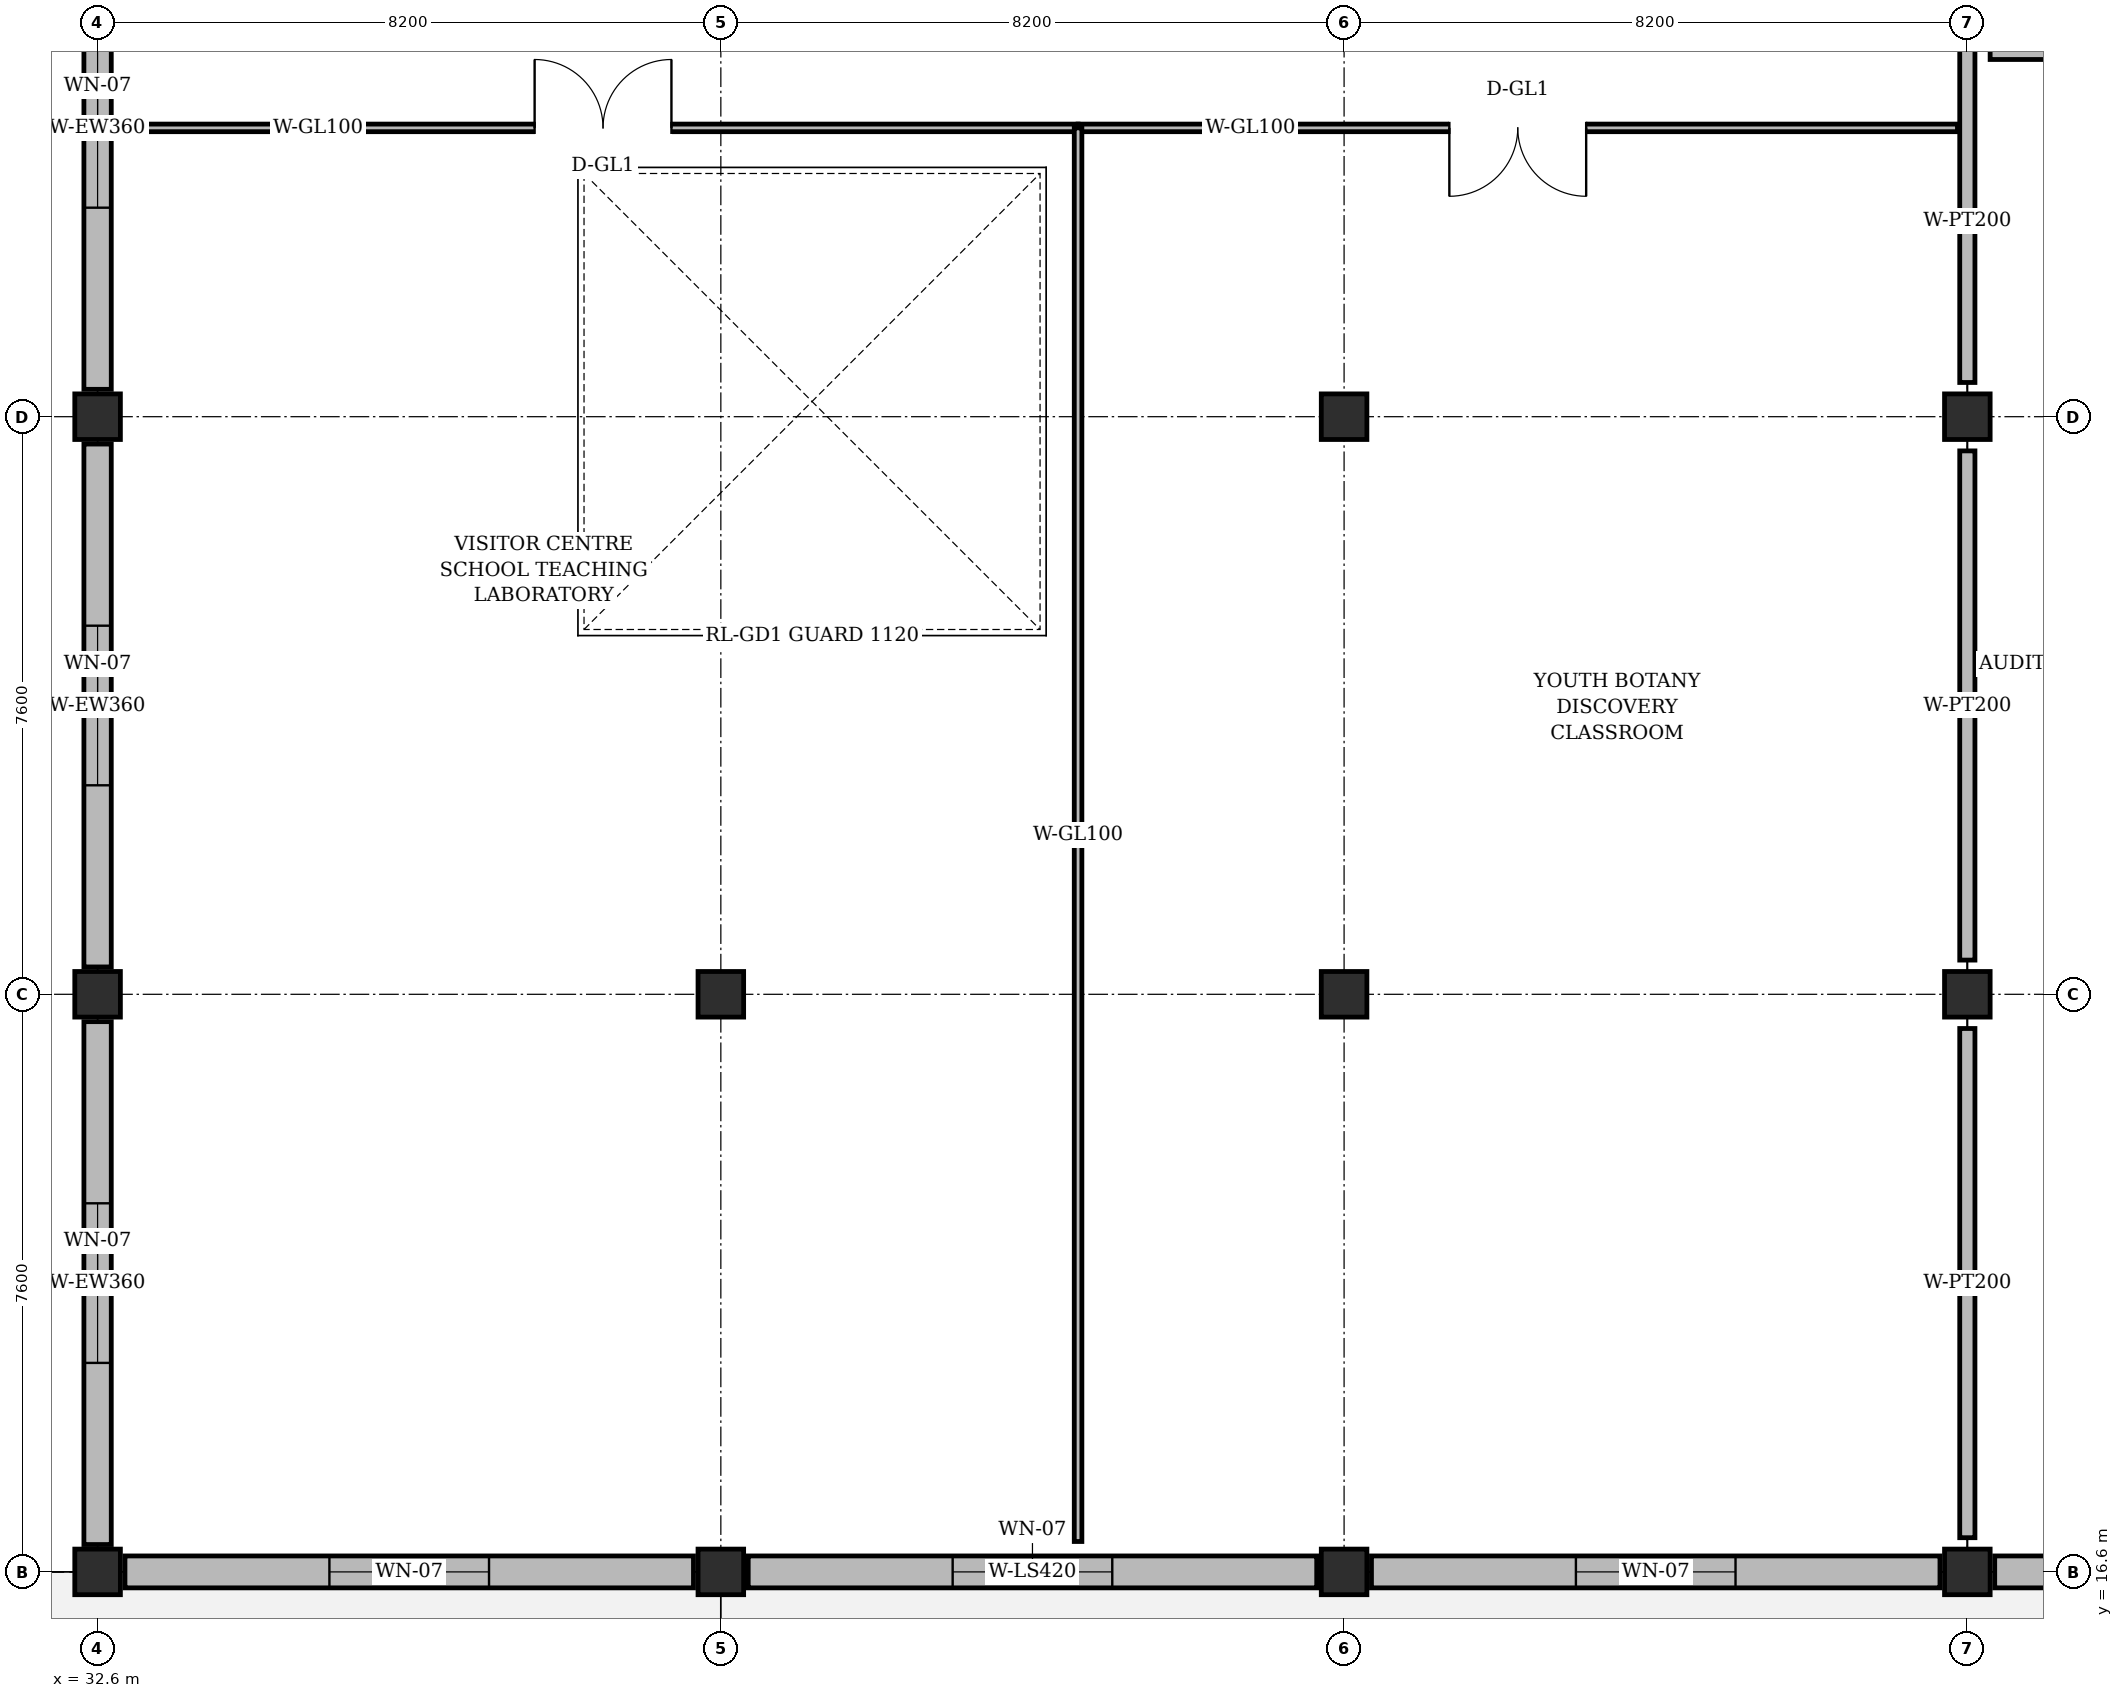
"""IFC4 building model, lengths in metres.
Left out: names, types, materials, properties, quantities, classifications, styles, units other than length and angle.
Written with IfcOpenShell. Run it as: python <this file> out.ifc"""

import sys

from ifc_helpers import new_model, si_unit, direction, frame, frame_2d, origin, origin_2d, place, context, subcontext, project, spatial, rectangle, extrude, element, fill, save


model = new_model("IFC4")
c1 = context("Model", 3, precision=1e-05, world=origin(), true_north=direction((0.0, 1.0)))
c2 = subcontext(c1, "Body", "Model", "MODEL_VIEW")
j1 = project(units=[si_unit("LENGTHUNIT", "METRE"), si_unit("PLANEANGLEUNIT", "RADIAN")], contexts=[c1])
p1 = place(None, origin())
s1 = spatial("IfcSite", under=j1, at=p1, CompositionType="ELEMENT")
p2 = place(p1, origin())
s2 = spatial("IfcBuilding", under=s1, at=p2, CompositionType="ELEMENT")
p3 = place(p2, frame((0.0, 0.0, 5.4)))
s3 = spatial("IfcBuildingStorey", under=s2, at=p3, CompositionType="ELEMENT", Elevation=5.4)
for number, where, z_axis, x_axis in (
    (1, (32.6, 16.6, 0.0), (0.0, 0.0, 1.0), (1.0, 0.0, 0.0)),
    (2, (32.6, 24.2, 0.0), (0.0, 0.0, 1.0), (1.0, 0.0, 0.0)),
    (3, (32.6, 31.8, 0.0), (0.0, 0.0, 1.0), (1.0, 0.0, 0.0)),
    (4, (40.8, 16.6, 0.0), (0.0, 0.0, 1.0), (1.0, 0.0, 0.0)),
    (5, (40.8, 24.2, 0.0), (0.0, 0.0, 1.0), (1.0, 0.0, 0.0)),
    (6, (49.0, 16.6, 0.0), (0.0, 0.0, 1.0), (1.0, 0.0, 0.0)),
    (7, (49.0, 24.2, 0.0), (0.0, 0.0, 1.0), (1.0, 0.0, 0.0)),
    (8, (49.0, 31.8, 0.0), (0.0, 0.0, 1.0), (1.0, 0.0, 0.0)),
    (9, (57.2, 16.6, 0.0), (0.0, 0.0, 1.0), (1.0, 0.0, 0.0)),
    (10, (57.2, 24.2, 0.0), (0.0, 0.0, 1.0), (1.0, 0.0, 0.0)),
    (11, (57.2, 31.8, 0.0), (0.0, 0.0, 1.0), (1.0, 0.0, 0.0)),
):
    element("IfcColumn", number, at=place(p3, frame(where, z_axis=z_axis, x_axis=x_axis)), inside=s3, PredefinedType="COLUMN", context=c2, shape_type="SweptSolid", body=[
        extrude(rectangle(XDim=0.6, YDim=0.6, at=origin_2d()), origin(), (0.0, 0.0, 1.0), 4.545),
    ])
p4 = place(p3, frame((57.56, 16.6, 0.0), z_axis=(0.0, 0.0, 1.0), x_axis=(1.0, 0.0, 0.0)))
e12 = element("IfcWall", 12, at=p4, inside=s3, PredefinedType="SOLIDWALL", context=c2, shape_type="SweptSolid", body=[
    extrude(rectangle(XDim=7.48, YDim=0.42, at=frame_2d((3.74, 0.0))), origin(), (0.0, 0.0, 1.0), 3.885),
])
p5 = place(p4, frame((3.14, 0.0, 0.95)))
e13 = element("IfcOpeningElement", 13, at=p5, cuts=e12, PredefinedType="OPENING", context=c2, shape_type="SweptSolid", body=[
    extrude(rectangle(XDim=1.2, YDim=2.6, at=frame_2d((0.6, 1.3))), frame((0.0, 0.222, 0.0), z_axis=(0.0, -1.0, 0.0), x_axis=(1.0, 0.0, 0.0)), (0.0, 0.0, 1.0), 0.444),
])
p6 = place(p3, frame((32.96, 16.6, 0.0), z_axis=(0.0, 0.0, 1.0), x_axis=(1.0, 0.0, 0.0)))
e14 = element("IfcWall", 14, at=p6, inside=s3, PredefinedType="SOLIDWALL", context=c2, shape_type="SweptSolid", body=[
    extrude(rectangle(XDim=7.48, YDim=0.42, at=frame_2d((3.74, 0.0))), origin(), (0.0, 0.0, 1.0), 3.885),
])
p7 = place(p6, frame((2.69, 0.0, 0.95)))
e15 = element("IfcOpeningElement", 15, at=p7, cuts=e14, PredefinedType="OPENING", context=c2, shape_type="SweptSolid", body=[
    extrude(rectangle(XDim=2.1, YDim=1.95, at=frame_2d((1.05, 0.975))), frame((0.0, 0.222, 0.0), z_axis=(0.0, -1.0, 0.0), x_axis=(1.0, 0.0, 0.0)), (0.0, 0.0, 1.0), 0.444),
])
p8 = place(p3, frame((41.16, 16.6, 0.0), z_axis=(0.0, 0.0, 1.0), x_axis=(1.0, 0.0, 0.0)))
e16 = element("IfcWall", 16, at=p8, inside=s3, PredefinedType="SOLIDWALL", context=c2, shape_type="SweptSolid", body=[
    extrude(rectangle(XDim=7.48, YDim=0.42, at=frame_2d((3.74, 0.0))), origin(), (0.0, 0.0, 1.0), 3.885),
])
p9 = place(p8, frame((2.69, 0.0, 0.95)))
e17 = element("IfcOpeningElement", 17, at=p9, cuts=e16, PredefinedType="OPENING", context=c2, shape_type="SweptSolid", body=[
    extrude(rectangle(XDim=2.1, YDim=1.95, at=frame_2d((1.05, 0.975))), frame((0.0, 0.222, 0.0), z_axis=(0.0, -1.0, 0.0), x_axis=(1.0, 0.0, 0.0)), (0.0, 0.0, 1.0), 0.444),
])
p10 = place(p3, frame((49.36, 16.6, 0.0), z_axis=(0.0, 0.0, 1.0), x_axis=(1.0, 0.0, 0.0)))
e18 = element("IfcWall", 18, at=p10, inside=s3, PredefinedType="SOLIDWALL", context=c2, shape_type="SweptSolid", body=[
    extrude(rectangle(XDim=7.48, YDim=0.42, at=frame_2d((3.74, 0.0))), origin(), (0.0, 0.0, 1.0), 3.885),
])
p11 = place(p10, frame((2.69, 0.0, 0.95)))
e19 = element("IfcOpeningElement", 19, at=p11, cuts=e18, PredefinedType="OPENING", context=c2, shape_type="SweptSolid", body=[
    extrude(rectangle(XDim=2.1, YDim=1.95, at=frame_2d((1.05, 0.975))), frame((0.0, 0.222, 0.0), z_axis=(0.0, -1.0, 0.0), x_axis=(1.0, 0.0, 0.0)), (0.0, 0.0, 1.0), 0.444),
])
p12 = place(p3, frame((32.6, 39.04, 0.0), z_axis=(0.0, 0.0, 1.0), x_axis=(0.0, -1.0, 0.0)))
e20 = element("IfcWall", 20, at=p12, inside=s3, PredefinedType="SOLIDWALL", context=c2, shape_type="SweptSolid", body=[
    extrude(rectangle(XDim=6.88, YDim=0.36, at=frame_2d((3.44, 0.0))), origin(), (0.0, 0.0, 1.0), 3.885),
])
p13 = place(p12, frame((2.39, 0.0, 0.95)))
e21 = element("IfcOpeningElement", 21, at=p13, cuts=e20, PredefinedType="OPENING", context=c2, shape_type="SweptSolid", body=[
    extrude(rectangle(XDim=2.1, YDim=1.95, at=frame_2d((1.05, 0.975))), frame((0.0, 0.192, 0.0), z_axis=(0.0, -1.0, 0.0), x_axis=(1.0, 0.0, 0.0)), (0.0, 0.0, 1.0), 0.384),
])
p14 = place(p3, frame((32.6, 31.44, 0.0), z_axis=(0.0, 0.0, 1.0), x_axis=(0.0, -1.0, 0.0)))
e22 = element("IfcWall", 22, at=p14, inside=s3, PredefinedType="SOLIDWALL", context=c2, shape_type="SweptSolid", body=[
    extrude(rectangle(XDim=6.88, YDim=0.36, at=frame_2d((3.44, 0.0))), origin(), (0.0, 0.0, 1.0), 3.885),
])
p15 = place(p14, frame((2.39, 0.0, 0.95)))
e23 = element("IfcOpeningElement", 23, at=p15, cuts=e22, PredefinedType="OPENING", context=c2, shape_type="SweptSolid", body=[
    extrude(rectangle(XDim=2.1, YDim=1.95, at=frame_2d((1.05, 0.975))), frame((0.0, 0.192, 0.0), z_axis=(0.0, -1.0, 0.0), x_axis=(1.0, 0.0, 0.0)), (0.0, 0.0, 1.0), 0.384),
])
p16 = place(p3, frame((32.6, 23.84, 0.0), z_axis=(0.0, 0.0, 1.0), x_axis=(0.0, -1.0, 0.0)))
e24 = element("IfcWall", 24, at=p16, inside=s3, PredefinedType="SOLIDWALL", context=c2, shape_type="SweptSolid", body=[
    extrude(rectangle(XDim=6.88, YDim=0.36, at=frame_2d((3.44, 0.0))), origin(), (0.0, 0.0, 1.0), 3.885),
])
p17 = place(p16, frame((2.39, 0.0, 0.95)))
e25 = element("IfcOpeningElement", 25, at=p17, cuts=e24, PredefinedType="OPENING", context=c2, shape_type="SweptSolid", body=[
    extrude(rectangle(XDim=2.1, YDim=1.95, at=frame_2d((1.05, 0.975))), frame((0.0, 0.192, 0.0), z_axis=(0.0, -1.0, 0.0), x_axis=(1.0, 0.0, 0.0)), (0.0, 0.0, 1.0), 0.384),
])
p18 = place(p3, frame((57.2, 17.05, 0.0), z_axis=(0.0, 0.0, 1.0), x_axis=(0.0, 1.0, 0.0)))
e26 = element("IfcWall", 26, at=p18, inside=s3, PredefinedType="PARTITIONING", context=c2, shape_type="SweptSolid", body=[
    extrude(rectangle(XDim=6.7, YDim=0.2, at=frame_2d((3.35, 0.0))), origin(), (0.0, 0.0, 1.0), 3.93),
])
p19 = place(p3, frame((57.2, 24.65, 0.0), z_axis=(0.0, 0.0, 1.0), x_axis=(0.0, 1.0, 0.0)))
e27 = element("IfcWall", 27, at=p19, inside=s3, PredefinedType="PARTITIONING", context=c2, shape_type="SweptSolid", body=[
    extrude(rectangle(XDim=6.7, YDim=0.2, at=frame_2d((3.35, 0.0))), origin(), (0.0, 0.0, 1.0), 3.93),
])
p20 = place(p3, frame((57.2, 32.25, 0.0), z_axis=(0.0, 0.0, 1.0), x_axis=(0.0, 1.0, 0.0)))
e28 = element("IfcWall", 28, at=p20, inside=s3, PredefinedType="PARTITIONING", context=c2, shape_type="SweptSolid", body=[
    extrude(rectangle(XDim=6.7, YDim=0.2, at=frame_2d((3.35, 0.0))), origin(), (0.0, 0.0, 1.0), 3.93),
])
p21 = place(p20, frame((4.6, 0.0, 0.0)))
e29 = element("IfcOpeningElement", 29, at=p21, cuts=e28, PredefinedType="OPENING", context=c2, shape_type="SweptSolid", body=[
    extrude(rectangle(XDim=1.8, YDim=2.4, at=frame_2d((0.9, 1.2))), frame((0.0, 0.112, 0.0), z_axis=(0.0, -1.0, 0.0), x_axis=(1.0, 0.0, 0.0)), (0.0, 0.0, 1.0), 0.224),
])
p22 = place(p3, frame((61.4, 36.6, 0.0), z_axis=(0.0, 0.0, 1.0), x_axis=(-1.0, 0.0, 0.0)))
e30 = element("IfcWall", 30, at=p22, inside=s3, PredefinedType="PARTITIONING", context=c2, shape_type="SweptSolid", body=[
    extrude(rectangle(XDim=3.9, YDim=0.2, at=frame_2d((1.95, 0.0))), origin(), (0.0, 0.0, 1.0), 4.405),
])
p23 = place(p22, frame((1.05, 0.0, 0.0)))
e31 = element("IfcOpeningElement", 31, at=p23, cuts=e30, PredefinedType="OPENING", context=c2, shape_type="SweptSolid", body=[
    extrude(rectangle(XDim=1.8, YDim=2.4, at=frame_2d((0.9, 1.2))), frame((0.0, 0.112, 0.0), z_axis=(0.0, -1.0, 0.0), x_axis=(1.0, 0.0, 0.0)), (0.0, 0.0, 1.0), 0.224),
])
p24 = place(p3, frame((45.5, 35.6, 0.0), z_axis=(0.0, 0.0, 1.0), x_axis=(-1.0, 0.0, 0.0)))
e32 = element("IfcWall", 32, at=p24, inside=s3, PredefinedType="PARTITIONING", context=c2, shape_type="SweptSolid", body=[
    extrude(rectangle(XDim=12.5, YDim=0.1, at=frame_2d((6.25, 0.0))), origin(), (0.0, 0.0, 1.0), 4.405),
])
p25 = place(p24, frame((5.35, 0.0, 0.0)))
e33 = element("IfcOpeningElement", 33, at=p25, cuts=e32, PredefinedType="OPENING", context=c2, shape_type="SweptSolid", body=[
    extrude(rectangle(XDim=1.8, YDim=2.4, at=frame_2d((0.9, 1.2))), frame((0.0, 0.062, 0.0), z_axis=(0.0, -1.0, 0.0), x_axis=(1.0, 0.0, 0.0)), (0.0, 0.0, 1.0), 0.124),
])
p26 = place(p3, frame((57.07, 35.6, 0.0), z_axis=(0.0, 0.0, 1.0), x_axis=(-1.0, 0.0, 0.0)))
e34 = element("IfcWall", 34, at=p26, inside=s3, PredefinedType="PARTITIONING", context=c2, shape_type="SweptSolid", body=[
    extrude(rectangle(XDim=11.57, YDim=0.1, at=frame_2d((5.785, 0.0))), origin(), (0.0, 0.0, 1.0), 4.405),
])
p27 = place(p26, frame((4.885, 0.0, 0.0)))
e35 = element("IfcOpeningElement", 35, at=p27, cuts=e34, PredefinedType="OPENING", context=c2, shape_type="SweptSolid", body=[
    extrude(rectangle(XDim=1.8, YDim=2.4, at=frame_2d((0.9, 1.2))), frame((0.0, 0.062, 0.0), z_axis=(0.0, -1.0, 0.0), x_axis=(1.0, 0.0, 0.0)), (0.0, 0.0, 1.0), 0.124),
])
p28 = place(p3, frame((45.5, 35.6, 0.0), z_axis=(0.0, 0.0, 1.0), x_axis=(0.0, -1.0, 0.0)))
e36 = element("IfcWall", 36, at=p28, inside=s3, PredefinedType="PARTITIONING", context=c2, shape_type="SweptSolid", body=[
    extrude(rectangle(XDim=18.6, YDim=0.1, at=frame_2d((9.3, 0.0))), origin(), (0.0, 0.0, 1.0), 4.405),
])
p29 = place(p7, origin())
e37 = element("IfcWindow", 37, at=p29, inside=s3, PartitioningType="DOUBLE_PANEL_VERTICAL", PredefinedType="WINDOW", context=c2, shape_type="SweptSolid", body=[
    extrude(rectangle(XDim=2.1, YDim=1.95, at=frame_2d((1.05, 0.975))), frame((0.0, 0.03, 0.0), z_axis=(0.0, -1.0, 0.0), x_axis=(1.0, 0.0, 0.0)), (0.0, 0.0, 1.0), 0.06),
])
fill(e15, e37)
p30 = place(p9, origin())
e38 = element("IfcWindow", 38, at=p30, inside=s3, PartitioningType="DOUBLE_PANEL_VERTICAL", PredefinedType="WINDOW", context=c2, shape_type="SweptSolid", body=[
    extrude(rectangle(XDim=2.1, YDim=1.95, at=frame_2d((1.05, 0.975))), frame((0.0, 0.03, 0.0), z_axis=(0.0, -1.0, 0.0), x_axis=(1.0, 0.0, 0.0)), (0.0, 0.0, 1.0), 0.06),
])
fill(e17, e38)
p31 = place(p11, origin())
e39 = element("IfcWindow", 39, at=p31, inside=s3, PartitioningType="DOUBLE_PANEL_VERTICAL", PredefinedType="WINDOW", context=c2, shape_type="SweptSolid", body=[
    extrude(rectangle(XDim=2.1, YDim=1.95, at=frame_2d((1.05, 0.975))), frame((0.0, 0.03, 0.0), z_axis=(0.0, -1.0, 0.0), x_axis=(1.0, 0.0, 0.0)), (0.0, 0.0, 1.0), 0.06),
])
fill(e19, e39)
p32 = place(p13, origin())
e40 = element("IfcWindow", 40, at=p32, inside=s3, PartitioningType="DOUBLE_PANEL_VERTICAL", PredefinedType="WINDOW", context=c2, shape_type="SweptSolid", body=[
    extrude(rectangle(XDim=2.1, YDim=1.95, at=frame_2d((1.05, 0.975))), frame((0.0, 0.03, 0.0), z_axis=(0.0, -1.0, 0.0), x_axis=(1.0, 0.0, 0.0)), (0.0, 0.0, 1.0), 0.06),
])
fill(e21, e40)
p33 = place(p15, origin())
e41 = element("IfcWindow", 41, at=p33, inside=s3, PartitioningType="DOUBLE_PANEL_VERTICAL", PredefinedType="WINDOW", context=c2, shape_type="SweptSolid", body=[
    extrude(rectangle(XDim=2.1, YDim=1.95, at=frame_2d((1.05, 0.975))), frame((0.0, 0.03, 0.0), z_axis=(0.0, -1.0, 0.0), x_axis=(1.0, 0.0, 0.0)), (0.0, 0.0, 1.0), 0.06),
])
fill(e23, e41)
p34 = place(p17, origin())
e42 = element("IfcWindow", 42, at=p34, inside=s3, PartitioningType="DOUBLE_PANEL_VERTICAL", PredefinedType="WINDOW", context=c2, shape_type="SweptSolid", body=[
    extrude(rectangle(XDim=2.1, YDim=1.95, at=frame_2d((1.05, 0.975))), frame((0.0, 0.03, 0.0), z_axis=(0.0, -1.0, 0.0), x_axis=(1.0, 0.0, 0.0)), (0.0, 0.0, 1.0), 0.06),
])
fill(e25, e42)
p35 = place(p25, frame((1.8, 0.0, 0.0), z_axis=(0.0, 0.0, 1.0), x_axis=(-1.0, 0.0, 0.0)))
e43 = element("IfcDoor", 43, at=p35, inside=s3, OperationType="DOUBLE_DOOR_SINGLE_SWING", PredefinedType="DOOR", context=c2, shape_type="SweptSolid", body=[
    extrude(rectangle(XDim=1.8, YDim=2.4, at=frame_2d((0.9, 1.2))), frame((0.0, 0.025, 0.0), z_axis=(0.0, -1.0, 0.0), x_axis=(1.0, 0.0, 0.0)), (0.0, 0.0, 1.0), 0.05),
])
fill(e33, e43)
p36 = place(p27, origin())
e44 = element("IfcDoor", 44, at=p36, inside=s3, OperationType="DOUBLE_DOOR_SINGLE_SWING", PredefinedType="DOOR", context=c2, shape_type="SweptSolid", body=[
    extrude(rectangle(XDim=1.8, YDim=2.4, at=frame_2d((0.9, 1.2))), frame((0.0, 0.025, 0.0), z_axis=(0.0, -1.0, 0.0), x_axis=(1.0, 0.0, 0.0)), (0.0, 0.0, 1.0), 0.05),
])
fill(e35, e44)
save(model, sys.argv[1])
